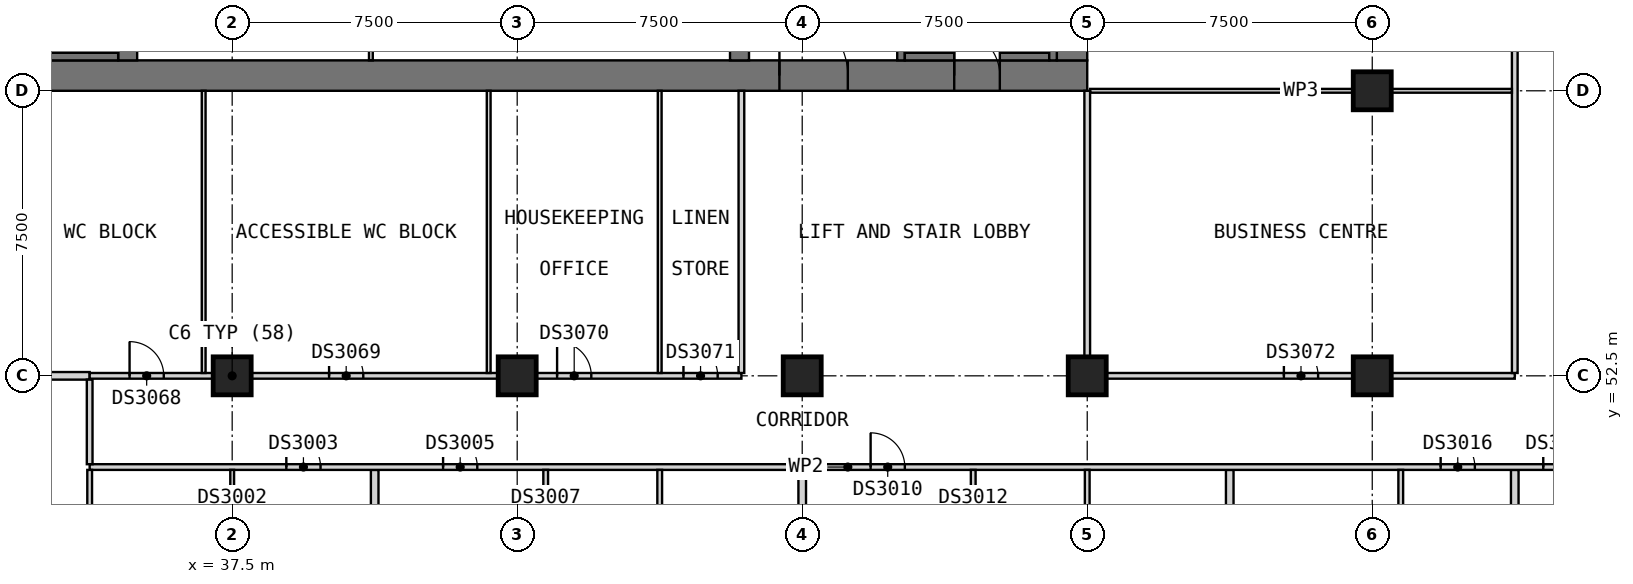
"""IFC4 building model, lengths in metres.
Left out: names, types, materials, properties, quantities, classifications, styles, units other than length and angle.
Written with IfcOpenShell. Run it as: python <this file> out.ifc"""

import sys

from ifc_helpers import new_model, si_unit, direction, frame, frame_2d, origin, origin_2d, place, context, subcontext, project, spatial, rectangle, extrude, element, fill, save


model = new_model("IFC4")
c1 = context("Model", 3, precision=1e-05, world=origin(), true_north=direction((0.0, 1.0)))
c2 = subcontext(c1, "Body", "Model", "MODEL_VIEW")
j1 = project(units=[si_unit("LENGTHUNIT", "METRE"), si_unit("PLANEANGLEUNIT", "RADIAN")], contexts=[c1])
p1 = place(None, origin())
s1 = spatial("IfcSite", under=j1, at=p1, CompositionType="ELEMENT")
p2 = place(p1, origin())
s2 = spatial("IfcBuilding", under=s1, at=p2, CompositionType="ELEMENT")
p3 = place(p2, frame((0.0, 0.0, 137.4)))
s3 = spatial("IfcBuildingStorey", under=s2, at=p3, CompositionType="ELEMENT", Elevation=137.4)
for number, where, z_axis, x_axis in (
    (1, (37.5, 52.5, 0.0), (0.0, 0.0, 1.0), (1.0, 0.0, 0.0)),
    (2, (45.0, 52.5, 0.0), (0.0, 0.0, 1.0), (1.0, 0.0, 0.0)),
    (3, (52.5, 52.5, 0.0), (0.0, 0.0, 1.0), (1.0, 0.0, 0.0)),
    (4, (60.0, 52.5, 0.0), (0.0, 0.0, 1.0), (1.0, 0.0, 0.0)),
    (5, (67.5, 52.5, 0.0), (0.0, 0.0, 1.0), (1.0, 0.0, 0.0)),
    (6, (67.5, 60.0, 0.0), (0.0, 0.0, 1.0), (1.0, 0.0, 0.0)),
):
    element("IfcColumn", number, at=place(p3, frame(where, z_axis=z_axis, x_axis=x_axis)), inside=s3, PredefinedType="COLUMN", context=c2, shape_type="SweptSolid", body=[
        extrude(rectangle(XDim=1.0, YDim=1.0, at=origin_2d()), origin(), (0.0, 0.0, 1.0), 3.6),
    ])
p4 = place(p3, frame((30.0, 60.4, 0.0), z_axis=(0.0, 0.0, 1.0), x_axis=(1.0, 0.0, 0.0)))
e7 = element("IfcWall", 7, at=p4, inside=s3, PredefinedType="SHEAR", context=c2, shape_type="SweptSolid", body=[
    extrude(rectangle(XDim=30.0, YDim=0.8, at=frame_2d((15.0, 0.0))), origin(), (0.0, 0.0, 1.0), 3.6),
])
p5 = place(p4, frame((21.9, 0.0, 0.0)))
e8 = element("IfcOpeningElement", 8, at=p5, cuts=e7, PredefinedType="OPENING", context=c2, shape_type="SweptSolid", body=[
    extrude(rectangle(XDim=1.8, YDim=2.1, at=frame_2d((0.9, 1.05))), frame((0.0, 0.41, 0.0), z_axis=(0.0, -1.0, 0.0), x_axis=(1.0, 0.0, 0.0)), (0.0, 0.0, 1.0), 0.82),
])
p6 = place(p4, frame((26.5, 0.0, 0.0)))
e9 = element("IfcOpeningElement", 9, at=p6, cuts=e7, PredefinedType="OPENING", context=c2, shape_type="SweptSolid", body=[
    extrude(rectangle(XDim=1.2, YDim=2.1, at=frame_2d((0.6, 1.05))), frame((0.0, 0.41, 0.0), z_axis=(0.0, -1.0, 0.0), x_axis=(1.0, 0.0, 0.0)), (0.0, 0.0, 1.0), 0.82),
])
p7 = place(p3, frame((59.6, 60.8, 0.0), z_axis=(0.0, 0.0, 1.0), x_axis=(0.0, 1.0, 0.0)))
e10 = element("IfcWall", 10, at=p7, inside=s3, PredefinedType="SHEAR", context=c2, shape_type="SweptSolid", body=[
    extrude(rectangle(XDim=20.9, YDim=0.8, at=frame_2d((10.45, 0.0))), origin(), (0.0, 0.0, 1.0), 3.6),
])
p8 = place(p7, frame((14.7, 0.0, 0.0)))
e11 = element("IfcOpeningElement", 11, at=p8, cuts=e10, PredefinedType="OPENING", context=c2, shape_type="SweptSolid", body=[
    extrude(rectangle(XDim=1.8, YDim=2.1, at=frame_2d((0.9, 1.05))), frame((0.0, 0.41, 0.0), z_axis=(0.0, -1.0, 0.0), x_axis=(1.0, 0.0, 0.0)), (0.0, 0.0, 1.0), 0.82),
])
for number, where, z_axis, x_axis in (
    (12, (34.75, 60.8, 0.0), (0.0, 0.0, 1.0), (0.0, 1.0, 0.0)),
    (13, (50.85, 60.8, 0.0), (0.0, 0.0, 1.0), (0.0, 1.0, 0.0)),
):
    element("IfcWall", number, at=place(p3, frame(where, z_axis=z_axis, x_axis=x_axis)), inside=s3, PredefinedType="SHEAR", context=c2, shape_type="SweptSolid", body=[
        extrude(rectangle(XDim=3.4, YDim=0.5, at=frame_2d((1.7, 0.0))), origin(), (0.0, 0.0, 1.0), 3.6),
    ])
p9 = place(p3, frame((41.15, 60.8, 0.0), z_axis=(0.0, 0.0, 1.0), x_axis=(0.0, 1.0, 0.0)))
e14 = element("IfcWall", 14, at=p9, inside=s3, PredefinedType="PARTITIONING", context=c2, shape_type="SweptSolid", body=[
    extrude(rectangle(XDim=3.2, YDim=0.1, at=frame_2d((1.6, 0.0))), origin(), (0.0, 0.0, 1.0), 3.35),
])
p10 = place(p3, frame((55.1, 60.8, 0.0), z_axis=(0.0, 0.0, 1.0), x_axis=(0.0, 1.0, 0.0)))
e15 = element("IfcWall", 15, at=p10, inside=s3, PredefinedType="SOLIDWALL", context=c2, shape_type="SweptSolid", body=[
    extrude(rectangle(XDim=7.8, YDim=0.2, at=frame_2d((3.9, 0.0))), origin(), (0.0, 0.0, 1.0), 3.35),
])
p11 = place(p3, frame((31.0, 60.9, 0.0), z_axis=(0.0, 0.0, 1.0), x_axis=(1.0, 0.0, 0.0)))
e16 = element("IfcWall", 16, at=p11, inside=s3, PredefinedType="SOLIDWALL", context=c2, shape_type="SweptSolid", body=[
    extrude(rectangle(XDim=3.5, YDim=0.2, at=frame_2d((1.75, 0.0))), origin(), (0.0, 0.0, 1.0), 3.35),
])
for number, where, z_axis, x_axis in (
    (17, (55.2, 60.9, 0.0), (0.0, 0.0, 1.0), (1.0, 0.0, 0.0)),
    (18, (57.7, 60.9, 0.0), (0.0, 0.0, 1.0), (1.0, 0.0, 0.0)),
):
    element("IfcWall", number, at=place(p3, frame(where, z_axis=z_axis, x_axis=x_axis)), inside=s3, PredefinedType="SOLIDWALL", context=c2, shape_type="SweptSolid", body=[
        extrude(rectangle(XDim=1.3, YDim=0.2, at=frame_2d((0.65, 0.0))), origin(), (0.0, 0.0, 1.0), 3.35),
    ])
p12 = place(p3, frame((59.1, 60.8, 0.0), z_axis=(0.0, 0.0, 1.0), x_axis=(0.0, 1.0, 0.0)))
e19 = element("IfcWall", 19, at=p12, inside=s3, PredefinedType="SOLIDWALL", context=c2, shape_type="SweptSolid", body=[
    extrude(rectangle(XDim=7.7, YDim=0.2, at=frame_2d((3.85, 0.0))), origin(), (0.0, 0.0, 1.0), 3.35),
])
p13 = place(p3, frame((30.0, 52.5, 0.0), z_axis=(0.0, 0.0, 1.0), x_axis=(1.0, 0.0, 0.0)))
e20 = element("IfcWall", 20, at=p13, inside=s3, PredefinedType="PARTITIONING", context=c2, shape_type="SweptSolid", body=[
    extrude(rectangle(XDim=3.75, YDim=0.2, at=frame_2d((1.875, 0.0))), origin(), (0.0, 0.0, 1.0), 3.35),
])
p14 = place(p3, frame((41.25, 38.31, 0.0), z_axis=(0.0, 0.0, 1.0), x_axis=(0.0, 1.0, 0.0)))
e21 = element("IfcWall", 21, at=p14, inside=s3, PredefinedType="PARTITIONING", context=c2, shape_type="SweptSolid", body=[
    extrude(rectangle(XDim=11.715, YDim=0.2, at=frame_2d((5.857, 0.0))), origin(), (0.0, 0.0, 1.0), 3.35),
])
p15 = place(p3, frame((52.5, 37.5, 0.0), z_axis=(0.0, 0.0, 1.0), x_axis=(0.0, 1.0, 0.0)))
e22 = element("IfcWall", 22, at=p15, inside=s3, PredefinedType="PARTITIONING", context=c2, shape_type="SweptSolid", body=[
    extrude(rectangle(XDim=12.525, YDim=0.2, at=frame_2d((6.262, 0.0))), origin(), (0.0, 0.0, 1.0), 3.35),
])
for number, where, z_axis, x_axis in (
    (23, (63.75, 38.31, 0.0), (0.0, 0.0, 1.0), (0.0, 1.0, 0.0)),
    (24, (71.25, 38.31, 0.0), (0.0, 0.0, 1.0), (0.0, 1.0, 0.0)),
):
    element("IfcWall", number, at=place(p3, frame(where, z_axis=z_axis, x_axis=x_axis)), inside=s3, PredefinedType="PARTITIONING", context=c2, shape_type="SweptSolid", body=[
        extrude(rectangle(XDim=11.715, YDim=0.2, at=frame_2d((5.857, 0.0))), origin(), (0.0, 0.0, 1.0), 3.35),
    ])
p16 = place(p3, frame((33.75, 50.1, 0.0), z_axis=(0.0, 0.0, 1.0), x_axis=(1.0, 0.0, 0.0)))
e25 = element("IfcWall", 25, at=p16, inside=s3, PredefinedType="PARTITIONING", context=c2, shape_type="SweptSolid", body=[
    extrude(rectangle(XDim=39.9, YDim=0.15, at=frame_2d((19.95, 0.0))), origin(), (0.0, 0.0, 1.0), 3.35),
])
p17 = place(p16, frame((5.175, 0.0, 0.0)))
e26 = element("IfcOpeningElement", 26, at=p17, cuts=e25, PredefinedType="OPENING", context=c2, shape_type="SweptSolid", body=[
    extrude(rectangle(XDim=0.9, YDim=2.1, at=frame_2d((0.45, 1.05))), frame((0.0, 0.085, 0.0), z_axis=(0.0, -1.0, 0.0), x_axis=(1.0, 0.0, 0.0)), (0.0, 0.0, 1.0), 0.17),
])
p18 = place(p16, frame((9.3, 0.0, 0.0)))
e27 = element("IfcOpeningElement", 27, at=p18, cuts=e25, PredefinedType="OPENING", context=c2, shape_type="SweptSolid", body=[
    extrude(rectangle(XDim=0.9, YDim=2.1, at=frame_2d((0.45, 1.05))), frame((0.0, 0.085, 0.0), z_axis=(0.0, -1.0, 0.0), x_axis=(1.0, 0.0, 0.0)), (0.0, 0.0, 1.0), 0.17),
])
p19 = place(p16, frame((20.55, 0.0, 0.0)))
e28 = element("IfcOpeningElement", 28, at=p19, cuts=e25, PredefinedType="OPENING", context=c2, shape_type="SweptSolid", body=[
    extrude(rectangle(XDim=0.9, YDim=2.1, at=frame_2d((0.45, 1.05))), frame((0.0, 0.085, 0.0), z_axis=(0.0, -1.0, 0.0), x_axis=(1.0, 0.0, 0.0)), (0.0, 0.0, 1.0), 0.17),
])
p20 = place(p16, frame((35.55, 0.0, 0.0)))
e29 = element("IfcOpeningElement", 29, at=p20, cuts=e25, PredefinedType="OPENING", context=c2, shape_type="SweptSolid", body=[
    extrude(rectangle(XDim=0.9, YDim=2.1, at=frame_2d((0.45, 1.05))), frame((0.0, 0.085, 0.0), z_axis=(0.0, -1.0, 0.0), x_axis=(1.0, 0.0, 0.0)), (0.0, 0.0, 1.0), 0.17),
])
p21 = place(p16, frame((38.25, 0.0, 0.0)))
e30 = element("IfcOpeningElement", 30, at=p21, cuts=e25, PredefinedType="OPENING", context=c2, shape_type="SweptSolid", body=[
    extrude(rectangle(XDim=0.9, YDim=2.1, at=frame_2d((0.45, 1.05))), frame((0.0, 0.085, 0.0), z_axis=(0.0, -1.0, 0.0), x_axis=(1.0, 0.0, 0.0)), (0.0, 0.0, 1.0), 0.17),
])
p22 = place(p3, frame((33.75, 52.5, 0.0), z_axis=(0.0, 0.0, 1.0), x_axis=(1.0, 0.0, 0.0)))
e31 = element("IfcWall", 31, at=p22, inside=s3, PredefinedType="PARTITIONING", context=c2, shape_type="SweptSolid", body=[
    extrude(rectangle(XDim=17.15, YDim=0.15, at=frame_2d((8.575, 0.0))), origin(), (0.0, 0.0, 1.0), 3.35),
])
p23 = place(p22, frame((1.05, 0.0, 0.0)))
e32 = element("IfcOpeningElement", 32, at=p23, cuts=e31, PredefinedType="OPENING", context=c2, shape_type="SweptSolid", body=[
    extrude(rectangle(XDim=0.9, YDim=2.1, at=frame_2d((0.45, 1.05))), frame((0.0, 0.085, 0.0), z_axis=(0.0, -1.0, 0.0), x_axis=(1.0, 0.0, 0.0)), (0.0, 0.0, 1.0), 0.17),
])
p24 = place(p22, frame((6.3, 0.0, 0.0)))
e33 = element("IfcOpeningElement", 33, at=p24, cuts=e31, PredefinedType="OPENING", context=c2, shape_type="SweptSolid", body=[
    extrude(rectangle(XDim=0.9, YDim=2.1, at=frame_2d((0.45, 1.05))), frame((0.0, 0.085, 0.0), z_axis=(0.0, -1.0, 0.0), x_axis=(1.0, 0.0, 0.0)), (0.0, 0.0, 1.0), 0.17),
])
p25 = place(p22, frame((12.3, 0.0, 0.0)))
e34 = element("IfcOpeningElement", 34, at=p25, cuts=e31, PredefinedType="OPENING", context=c2, shape_type="SweptSolid", body=[
    extrude(rectangle(XDim=0.9, YDim=2.1, at=frame_2d((0.45, 1.05))), frame((0.0, 0.085, 0.0), z_axis=(0.0, -1.0, 0.0), x_axis=(1.0, 0.0, 0.0)), (0.0, 0.0, 1.0), 0.17),
])
p26 = place(p22, frame((15.625, 0.0, 0.0)))
e35 = element("IfcOpeningElement", 35, at=p26, cuts=e31, PredefinedType="OPENING", context=c2, shape_type="SweptSolid", body=[
    extrude(rectangle(XDim=0.9, YDim=2.1, at=frame_2d((0.45, 1.05))), frame((0.0, 0.085, 0.0), z_axis=(0.0, -1.0, 0.0), x_axis=(1.0, 0.0, 0.0)), (0.0, 0.0, 1.0), 0.17),
])
p27 = place(p3, frame((60.0, 52.5, 0.0), z_axis=(0.0, 0.0, 1.0), x_axis=(1.0, 0.0, 0.0)))
e36 = element("IfcWall", 36, at=p27, inside=s3, PredefinedType="PARTITIONING", context=c2, shape_type="SweptSolid", body=[
    extrude(rectangle(XDim=11.25, YDim=0.15, at=frame_2d((5.625, 0.0))), origin(), (0.0, 0.0, 1.0), 3.35),
])
p28 = place(p27, frame((5.175, 0.0, 0.0)))
e37 = element("IfcOpeningElement", 37, at=p28, cuts=e36, PredefinedType="OPENING", context=c2, shape_type="SweptSolid", body=[
    extrude(rectangle(XDim=0.9, YDim=2.1, at=frame_2d((0.45, 1.05))), frame((0.0, 0.085, 0.0), z_axis=(0.0, -1.0, 0.0), x_axis=(1.0, 0.0, 0.0)), (0.0, 0.0, 1.0), 0.17),
])
p29 = place(p3, frame((33.75, 50.175, 0.0), z_axis=(0.0, 0.0, 1.0), x_axis=(0.0, 1.0, 0.0)))
e38 = element("IfcWall", 38, at=p29, inside=s3, PredefinedType="PARTITIONING", context=c2, shape_type="SweptSolid", body=[
    extrude(rectangle(XDim=2.225, YDim=0.15, at=frame_2d((1.112, 0.0))), origin(), (0.0, 0.0, 1.0), 3.35),
])
p30 = place(p3, frame((71.25, 52.575, 0.0), z_axis=(0.0, 0.0, 1.0), x_axis=(0.0, 1.0, 0.0)))
e39 = element("IfcWall", 39, at=p30, inside=s3, PredefinedType="PARTITIONING", context=c2, shape_type="SweptSolid", body=[
    extrude(rectangle(XDim=11.85, YDim=0.15, at=frame_2d((5.925, 0.0))), origin(), (0.0, 0.0, 1.0), 3.35),
])
p31 = place(p30, frame((9.225, 0.0, 0.0)))
e40 = element("IfcOpeningElement", 40, at=p31, cuts=e39, PredefinedType="OPENING", context=c2, shape_type="SweptSolid", body=[
    extrude(rectangle(XDim=0.9, YDim=2.1, at=frame_2d((0.45, 1.05))), frame((0.0, 0.085, 0.0), z_axis=(0.0, -1.0, 0.0), x_axis=(1.0, 0.0, 0.0)), (0.0, 0.0, 1.0), 0.17),
])
p32 = place(p3, frame((60.075, 60.0, 0.0), z_axis=(0.0, 0.0, 1.0), x_axis=(1.0, 0.0, 0.0)))
e41 = element("IfcWall", 41, at=p32, inside=s3, PredefinedType="PARTITIONING", context=c2, shape_type="SweptSolid", body=[
    extrude(rectangle(XDim=11.1, YDim=0.1, at=frame_2d((5.55, 0.0))), origin(), (0.0, 0.0, 1.0), 3.35),
])
p33 = place(p3, frame((36.75, 52.575, 0.0), z_axis=(0.0, 0.0, 1.0), x_axis=(0.0, 1.0, 0.0)))
e42 = element("IfcWall", 42, at=p33, inside=s3, PredefinedType="PARTITIONING", context=c2, shape_type="SweptSolid", body=[
    extrude(rectangle(XDim=7.425, YDim=0.1, at=frame_2d((3.712, 0.0))), origin(), (0.0, 0.0, 1.0), 3.35),
])
p34 = place(p3, frame((37.5, 45.3, 0.0), z_axis=(0.0, 0.0, 1.0), x_axis=(0.0, 1.0, 0.0)))
e43 = element("IfcWall", 43, at=p34, inside=s3, PredefinedType="PARTITIONING", context=c2, shape_type="SweptSolid", body=[
    extrude(rectangle(XDim=4.725, YDim=0.1, at=frame_2d((2.362, 0.0))), origin(), (0.0, 0.0, 1.0), 3.35),
])
p35 = place(p34, frame((1.925, 0.0, 0.0)))
e44 = element("IfcOpeningElement", 44, at=p35, cuts=e43, PredefinedType="OPENING", context=c2, shape_type="SweptSolid", body=[
    extrude(rectangle(XDim=0.9, YDim=2.1, at=frame_2d((0.45, 1.05))), frame((0.0, 0.06, 0.0), z_axis=(0.0, -1.0, 0.0), x_axis=(1.0, 0.0, 0.0)), (0.0, 0.0, 1.0), 0.12),
])
for number, where, z_axis, x_axis in (
    (45, (44.25, 52.575, 0.0), (0.0, 0.0, 1.0), (0.0, 1.0, 0.0)),
    (46, (48.75, 52.575, 0.0), (0.0, 0.0, 1.0), (0.0, 1.0, 0.0)),
):
    element("IfcWall", number, at=place(p3, frame(where, z_axis=z_axis, x_axis=x_axis)), inside=s3, PredefinedType="PARTITIONING", context=c2, shape_type="SweptSolid", body=[
        extrude(rectangle(XDim=7.425, YDim=0.1, at=frame_2d((3.712, 0.0))), origin(), (0.0, 0.0, 1.0), 3.35),
    ])
p36 = place(p3, frame((33.75, 45.312, 0.0), z_axis=(0.0, 0.0, 1.0), x_axis=(0.0, 1.0, 0.0)))
e47 = element("IfcWall", 47, at=p36, inside=s3, PredefinedType="PARTITIONING", context=c2, shape_type="SweptSolid", body=[
    extrude(rectangle(XDim=4.712, YDim=0.125, at=frame_2d((2.356, 0.0))), origin(), (0.0, 0.0, 1.0), 3.35),
])
p37 = place(p3, frame((45.75, 45.312, 0.0), z_axis=(0.0, 0.0, 1.0), x_axis=(0.0, 1.0, 0.0)))
e48 = element("IfcWall", 48, at=p37, inside=s3, PredefinedType="PARTITIONING", context=c2, shape_type="SweptSolid", body=[
    extrude(rectangle(XDim=4.712, YDim=0.125, at=frame_2d((2.356, 0.0))), origin(), (0.0, 0.0, 1.0), 3.35),
])
p38 = place(p37, frame((1.913, 0.0, 0.0)))
e49 = element("IfcOpeningElement", 49, at=p38, cuts=e48, PredefinedType="OPENING", context=c2, shape_type="SweptSolid", body=[
    extrude(rectangle(XDim=0.9, YDim=2.1, at=frame_2d((0.45, 1.05))), frame((0.0, 0.073, 0.0), z_axis=(0.0, -1.0, 0.0), x_axis=(1.0, 0.0, 0.0)), (0.0, 0.0, 1.0), 0.145),
])
p39 = place(p3, frame((48.75, 45.312, 0.0), z_axis=(0.0, 0.0, 1.0), x_axis=(0.0, 1.0, 0.0)))
e50 = element("IfcWall", 50, at=p39, inside=s3, PredefinedType="PARTITIONING", context=c2, shape_type="SweptSolid", body=[
    extrude(rectangle(XDim=4.712, YDim=0.125, at=frame_2d((2.356, 0.0))), origin(), (0.0, 0.0, 1.0), 3.35),
])
p40 = place(p3, frame((57.0, 45.312, 0.0), z_axis=(0.0, 0.0, 1.0), x_axis=(0.0, 1.0, 0.0)))
e51 = element("IfcWall", 51, at=p40, inside=s3, PredefinedType="PARTITIONING", context=c2, shape_type="SweptSolid", body=[
    extrude(rectangle(XDim=4.712, YDim=0.125, at=frame_2d((2.356, 0.0))), origin(), (0.0, 0.0, 1.0), 3.35),
])
p41 = place(p40, frame((1.913, 0.0, 0.0)))
e52 = element("IfcOpeningElement", 52, at=p41, cuts=e51, PredefinedType="OPENING", context=c2, shape_type="SweptSolid", body=[
    extrude(rectangle(XDim=0.9, YDim=2.1, at=frame_2d((0.45, 1.05))), frame((0.0, 0.073, 0.0), z_axis=(0.0, -1.0, 0.0), x_axis=(1.0, 0.0, 0.0)), (0.0, 0.0, 1.0), 0.145),
])
for number, where, z_axis, x_axis in (
    (53, (60.0, 45.312, 0.0), (0.0, 0.0, 1.0), (0.0, 1.0, 0.0)),
    (54, (68.25, 45.312, 0.0), (0.0, 0.0, 1.0), (0.0, 1.0, 0.0)),
):
    element("IfcWall", number, at=place(p3, frame(where, z_axis=z_axis, x_axis=x_axis)), inside=s3, PredefinedType="PARTITIONING", context=c2, shape_type="SweptSolid", body=[
        extrude(rectangle(XDim=4.712, YDim=0.125, at=frame_2d((2.356, 0.0))), origin(), (0.0, 0.0, 1.0), 3.35),
    ])
for number, where, z_axis, x_axis in (
    (55, (50.9, 52.575, 0.0), (0.0, 0.0, 1.0), (0.0, 1.0, 0.0)),
    (56, (60.0, 52.575, 0.0), (0.0, 0.0, 1.0), (0.0, 1.0, 0.0)),
):
    element("IfcWall", number, at=place(p3, frame(where, z_axis=z_axis, x_axis=x_axis)), inside=s3, PredefinedType="PARTITIONING", context=c2, shape_type="SweptSolid", body=[
        extrude(rectangle(XDim=7.425, YDim=0.15, at=frame_2d((3.712, 0.0))), origin(), (0.0, 0.0, 1.0), 3.35),
    ])
p42 = place(p5, origin())
e57 = element("IfcDoor", 57, at=p42, inside=s3, OperationType="DOUBLE_DOOR_SINGLE_SWING", PredefinedType="DOOR", context=c2, shape_type="SweptSolid", body=[
    extrude(rectangle(XDim=1.8, YDim=2.1, at=frame_2d((0.9, 1.05))), frame((0.0, 0.025, 0.0), z_axis=(0.0, -1.0, 0.0), x_axis=(1.0, 0.0, 0.0)), (0.0, 0.0, 1.0), 0.05),
])
fill(e8, e57)
p43 = place(p6, origin())
e58 = element("IfcDoor", 58, at=p43, inside=s3, OperationType="SINGLE_SWING_LEFT", PredefinedType="DOOR", context=c2, shape_type="SweptSolid", body=[
    extrude(rectangle(XDim=1.2, YDim=2.1, at=frame_2d((0.6, 1.05))), frame((0.0, 0.025, 0.0), z_axis=(0.0, -1.0, 0.0), x_axis=(1.0, 0.0, 0.0)), (0.0, 0.0, 1.0), 0.05),
])
fill(e9, e58)
p44 = place(p17, origin())
e59 = element("IfcDoor", 59, at=p44, inside=s3, OperationType="SINGLE_SWING_RIGHT", PredefinedType="DOOR", context=c2, shape_type="SweptSolid", body=[
    extrude(rectangle(XDim=0.9, YDim=2.1, at=frame_2d((0.45, 1.05))), frame((0.0, 0.025, 0.0), z_axis=(0.0, -1.0, 0.0), x_axis=(1.0, 0.0, 0.0)), (0.0, 0.0, 1.0), 0.05),
])
fill(e26, e59)
p45 = place(p18, origin())
e60 = element("IfcDoor", 60, at=p45, inside=s3, OperationType="SINGLE_SWING_RIGHT", PredefinedType="DOOR", context=c2, shape_type="SweptSolid", body=[
    extrude(rectangle(XDim=0.9, YDim=2.1, at=frame_2d((0.45, 1.05))), frame((0.0, 0.025, 0.0), z_axis=(0.0, -1.0, 0.0), x_axis=(1.0, 0.0, 0.0)), (0.0, 0.0, 1.0), 0.05),
])
fill(e27, e60)
p46 = place(p19, origin())
e61 = element("IfcDoor", 61, at=p46, inside=s3, OperationType="SINGLE_SWING_RIGHT", PredefinedType="DOOR", context=c2, shape_type="SweptSolid", body=[
    extrude(rectangle(XDim=0.9, YDim=2.1, at=frame_2d((0.45, 1.05))), frame((0.0, 0.025, 0.0), z_axis=(0.0, -1.0, 0.0), x_axis=(1.0, 0.0, 0.0)), (0.0, 0.0, 1.0), 0.05),
])
fill(e28, e61)
p47 = place(p20, origin())
e62 = element("IfcDoor", 62, at=p47, inside=s3, OperationType="SINGLE_SWING_RIGHT", PredefinedType="DOOR", context=c2, shape_type="SweptSolid", body=[
    extrude(rectangle(XDim=0.9, YDim=2.1, at=frame_2d((0.45, 1.05))), frame((0.0, 0.025, 0.0), z_axis=(0.0, -1.0, 0.0), x_axis=(1.0, 0.0, 0.0)), (0.0, 0.0, 1.0), 0.05),
])
fill(e29, e62)
p48 = place(p21, origin())
e63 = element("IfcDoor", 63, at=p48, inside=s3, OperationType="SINGLE_SWING_LEFT", PredefinedType="DOOR", context=c2, shape_type="SweptSolid", body=[
    extrude(rectangle(XDim=0.9, YDim=2.1, at=frame_2d((0.45, 1.05))), frame((0.0, 0.025, 0.0), z_axis=(0.0, -1.0, 0.0), x_axis=(1.0, 0.0, 0.0)), (0.0, 0.0, 1.0), 0.05),
])
fill(e30, e63)
p49 = place(p23, origin())
e64 = element("IfcDoor", 64, at=p49, inside=s3, OperationType="SINGLE_SWING_LEFT", PredefinedType="DOOR", context=c2, shape_type="SweptSolid", body=[
    extrude(rectangle(XDim=0.9, YDim=2.1, at=frame_2d((0.45, 1.05))), frame((0.0, 0.025, 0.0), z_axis=(0.0, -1.0, 0.0), x_axis=(1.0, 0.0, 0.0)), (0.0, 0.0, 1.0), 0.05),
])
fill(e32, e64)
p50 = place(p24, origin())
e65 = element("IfcDoor", 65, at=p50, inside=s3, OperationType="SINGLE_SWING_LEFT", PredefinedType="DOOR", context=c2, shape_type="SweptSolid", body=[
    extrude(rectangle(XDim=0.9, YDim=2.1, at=frame_2d((0.45, 1.05))), frame((0.0, 0.025, 0.0), z_axis=(0.0, -1.0, 0.0), x_axis=(1.0, 0.0, 0.0)), (0.0, 0.0, 1.0), 0.05),
])
fill(e33, e65)
p51 = place(p25, origin())
e66 = element("IfcDoor", 66, at=p51, inside=s3, OperationType="SINGLE_SWING_LEFT", PredefinedType="DOOR", context=c2, shape_type="SweptSolid", body=[
    extrude(rectangle(XDim=0.9, YDim=2.1, at=frame_2d((0.45, 1.05))), frame((0.0, 0.025, 0.0), z_axis=(0.0, -1.0, 0.0), x_axis=(1.0, 0.0, 0.0)), (0.0, 0.0, 1.0), 0.05),
])
fill(e34, e66)
p52 = place(p26, origin())
e67 = element("IfcDoor", 67, at=p52, inside=s3, OperationType="SINGLE_SWING_LEFT", PredefinedType="DOOR", context=c2, shape_type="SweptSolid", body=[
    extrude(rectangle(XDim=0.9, YDim=2.1, at=frame_2d((0.45, 1.05))), frame((0.0, 0.025, 0.0), z_axis=(0.0, -1.0, 0.0), x_axis=(1.0, 0.0, 0.0)), (0.0, 0.0, 1.0), 0.05),
])
fill(e35, e67)
p53 = place(p28, origin())
e68 = element("IfcDoor", 68, at=p53, inside=s3, OperationType="SINGLE_SWING_LEFT", PredefinedType="DOOR", context=c2, shape_type="SweptSolid", body=[
    extrude(rectangle(XDim=0.9, YDim=2.1, at=frame_2d((0.45, 1.05))), frame((0.0, 0.025, 0.0), z_axis=(0.0, -1.0, 0.0), x_axis=(1.0, 0.0, 0.0)), (0.0, 0.0, 1.0), 0.05),
])
fill(e37, e68)
save(model, sys.argv[1])
